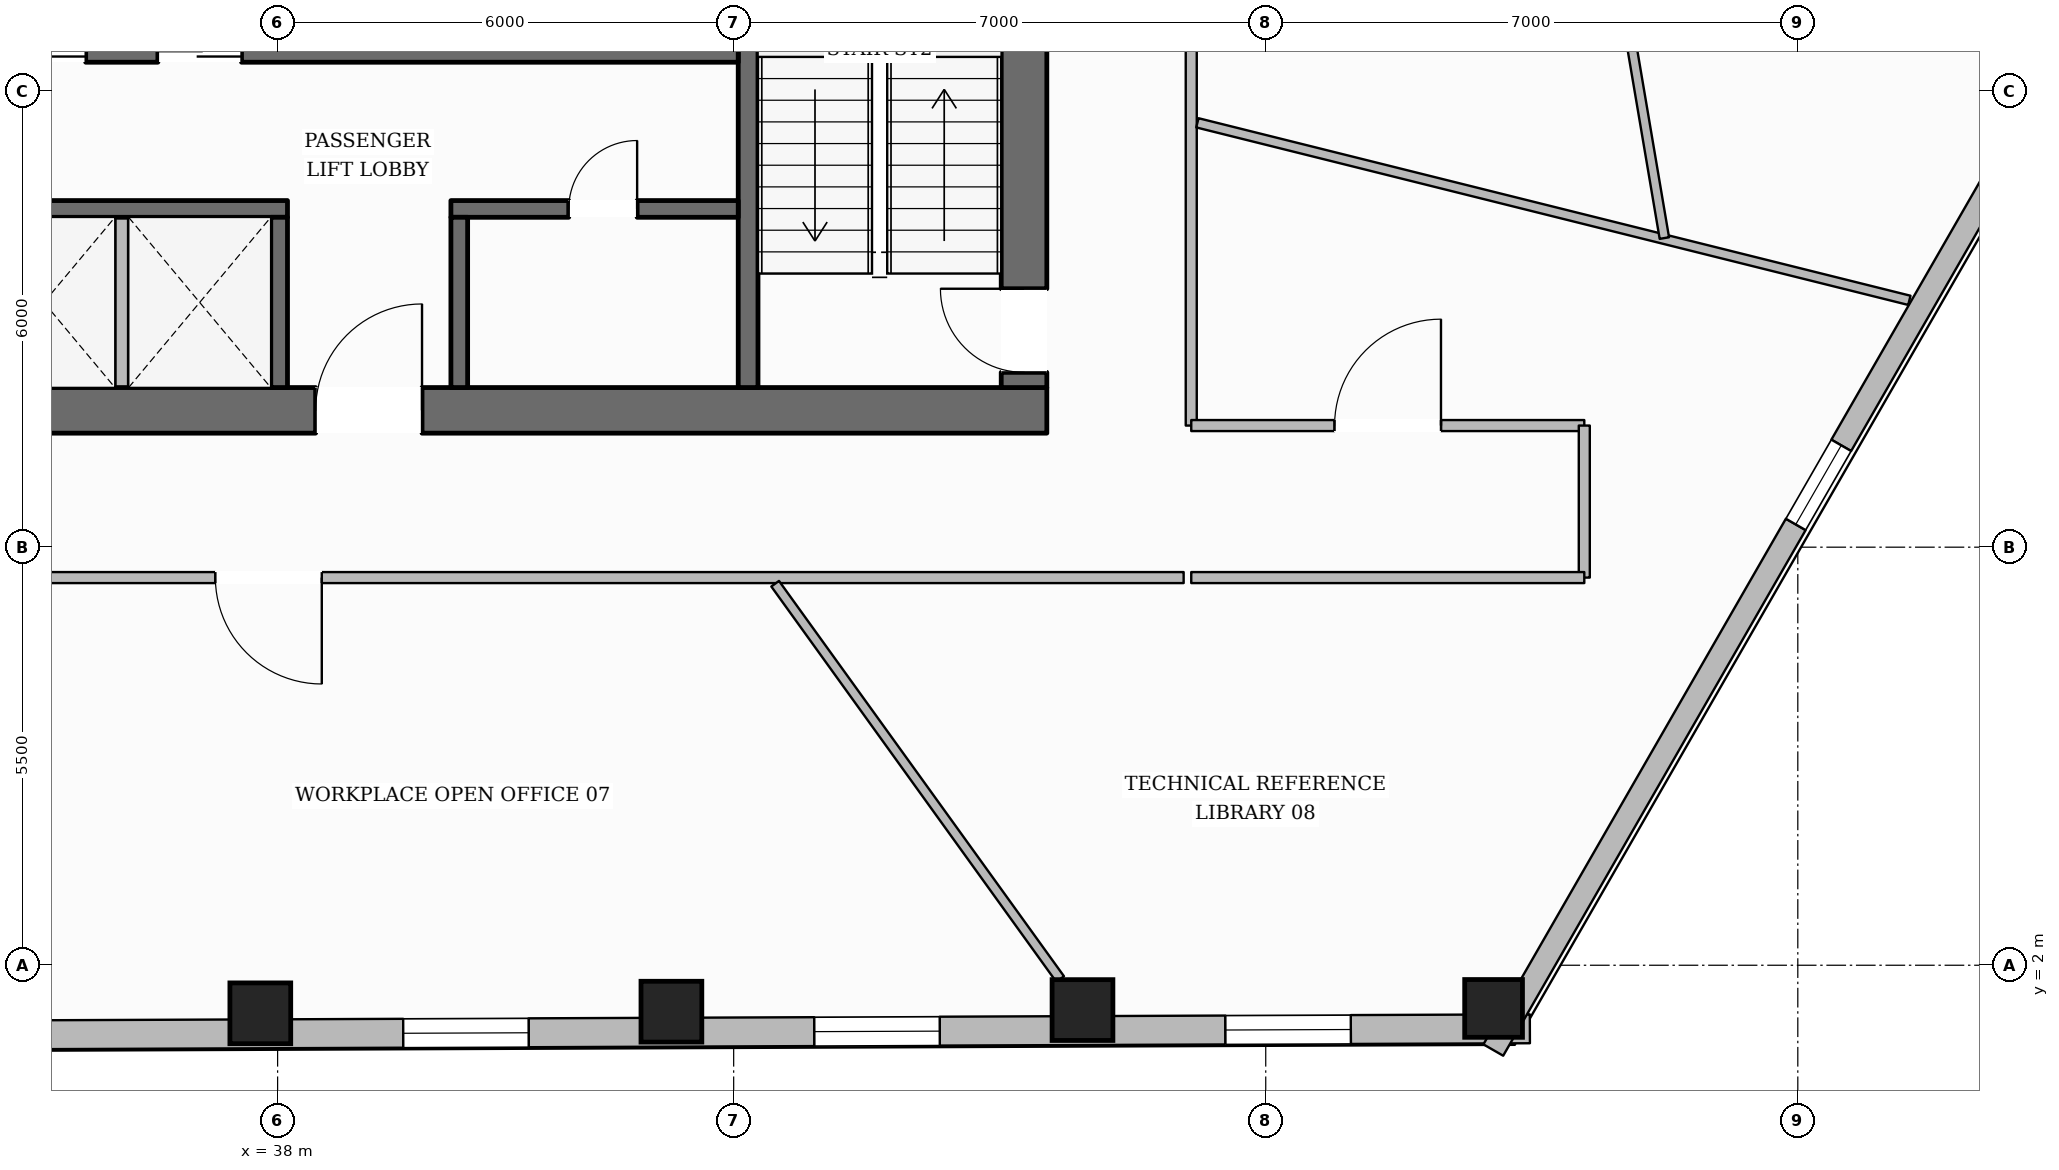
"""IFC4 building model, lengths in metres.
Left out: names, types, materials, properties, quantities, classifications, styles, units other than length and angle.
Written with IfcOpenShell. Run it as: python <this file> out.ifc"""

import sys

from ifc_helpers import new_model, si_unit, direction, frame, frame_2d, origin, origin_2d, place, context, subcontext, project, spatial, rectangle, hollow_rectangle, extrude, element, fill, save


model = new_model("IFC4")
c1 = context("Model", 3, precision=1e-05, world=origin(), true_north=direction((0.0, 1.0)))
c2 = subcontext(c1, "Body", "Model", "MODEL_VIEW")
j1 = project(units=[si_unit("LENGTHUNIT", "METRE"), si_unit("PLANEANGLEUNIT", "RADIAN")], contexts=[c1])
p1 = place(None, origin())
s1 = spatial("IfcSite", under=j1, at=p1, CompositionType="ELEMENT")
p2 = place(p1, origin())
s2 = spatial("IfcBuilding", under=s1, at=p2, CompositionType="ELEMENT")
p3 = place(p2, frame((0.0, 0.0, 13.7)))
s3 = spatial("IfcBuildingStorey", under=s2, at=p3, CompositionType="ELEMENT", Elevation=13.7)
p4 = place(p3, frame((27.88, 9.3, 0.0), z_axis=(0.0, 0.0, 1.0), x_axis=(1.0, 0.0, 0.0)))
e1 = element("IfcWall", 1, at=p4, inside=s3, PredefinedType="SOLIDWALL", context=c2, shape_type="SweptSolid", body=[
    extrude(rectangle(XDim=20.24, YDim=0.6, at=frame_2d((10.12, 0.0))), origin(), (0.0, 0.0, 1.0), 3.59),
])
p5 = place(p4, frame((10.62, 0.0, 0.0)))
e2 = element("IfcOpeningElement", 2, at=p5, cuts=e1, PredefinedType="OPENING", context=c2, shape_type="SweptSolid", body=[
    extrude(rectangle(XDim=1.4, YDim=2.2, at=frame_2d((0.7, 1.1))), frame((0.0, 0.31, 0.0), z_axis=(0.0, -1.0, 0.0), x_axis=(1.0, 0.0, 0.0)), (0.0, 0.0, 1.0), 0.62),
])
p6 = place(p3, frame((47.82, 9.6, 0.0), z_axis=(0.0, 0.0, 1.0), x_axis=(0.0, 1.0, 0.0)))
e3 = element("IfcWall", 3, at=p6, inside=s3, PredefinedType="SOLIDWALL", context=c2, shape_type="SweptSolid", body=[
    extrude(rectangle(XDim=13.0, YDim=0.6, at=frame_2d((6.5, 0.0))), origin(), (0.0, 0.0, 1.0), 3.59),
])
p7 = place(p6, frame((0.2, 0.0, 0.0)))
e4 = element("IfcOpeningElement", 4, at=p7, cuts=e3, PredefinedType="OPENING", context=c2, shape_type="SweptSolid", body=[
    extrude(rectangle(XDim=1.1, YDim=2.15, at=frame_2d((0.55, 1.075))), frame((0.0, 0.31, 0.0), z_axis=(0.0, -1.0, 0.0), x_axis=(1.0, 0.0, 0.0)), (0.0, 0.0, 1.0), 0.62),
])
p8 = place(p6, frame((8.4, 0.0, 0.0)))
e5 = element("IfcOpeningElement", 5, at=p8, cuts=e3, PredefinedType="OPENING", context=c2, shape_type="SweptSolid", body=[
    extrude(rectangle(XDim=0.9, YDim=2.1, at=frame_2d((0.45, 1.05))), frame((0.0, 0.31, 0.0), z_axis=(0.0, -1.0, 0.0), x_axis=(1.0, 0.0, 0.0)), (0.0, 0.0, 1.0), 0.62),
])
p9 = place(p3, frame((44.19, 9.6, 0.0), z_axis=(0.0, 0.0, 1.0), x_axis=(0.0, 1.0, 0.0)))
e6 = element("IfcWall", 6, at=p9, inside=s3, PredefinedType="SHEAR", context=c2, shape_type="SweptSolid", body=[
    extrude(rectangle(XDim=13.0, YDim=0.26, at=frame_2d((6.5, 0.0))), origin(), (0.0, 0.0, 1.0), 3.59),
])
p10 = place(p9, frame((10.925, 0.0, 0.0)))
e7 = element("IfcOpeningElement", 7, at=p10, cuts=e6, PredefinedType="OPENING", context=c2, shape_type="SweptSolid", body=[
    extrude(rectangle(XDim=1.25, YDim=2.25, at=frame_2d((0.625, 1.125))), frame((0.0, 0.14, 0.0), z_axis=(0.0, -1.0, 0.0), x_axis=(1.0, 0.0, 0.0)), (0.0, 0.0, 1.0), 0.28),
])
p11 = place(p3, frame((31.94, 13.99, 0.0), z_axis=(0.0, 0.0, 1.0), x_axis=(1.0, 0.0, 0.0)))
e8 = element("IfcWall", 8, at=p11, inside=s3, PredefinedType="SOLIDWALL", context=c2, shape_type="SweptSolid", body=[
    extrude(rectangle(XDim=12.12, YDim=0.22, at=frame_2d((6.06, 0.0))), origin(), (0.0, 0.0, 1.0), 3.59),
])
p12 = place(p11, frame((0.385, 0.0, 0.0)))
e9 = element("IfcOpeningElement", 9, at=p12, cuts=e8, PredefinedType="OPENING", context=c2, shape_type="SweptSolid", body=[
    extrude(rectangle(XDim=1.1, YDim=2.2, at=frame_2d((0.55, 1.1))), frame((0.0, 0.12, 0.0), z_axis=(0.0, -1.0, 0.0), x_axis=(1.0, 0.0, 0.0)), (0.0, 0.0, 1.0), 0.24),
])
p13 = place(p11, frame((2.435, 0.0, 0.0)))
e10 = element("IfcOpeningElement", 10, at=p13, cuts=e8, PredefinedType="OPENING", context=c2, shape_type="SweptSolid", body=[
    extrude(rectangle(XDim=1.1, YDim=2.2, at=frame_2d((0.55, 1.1))), frame((0.0, 0.12, 0.0), z_axis=(0.0, -1.0, 0.0), x_axis=(1.0, 0.0, 0.0)), (0.0, 0.0, 1.0), 0.24),
])
p14 = place(p11, frame((4.485, 0.0, 0.0)))
e11 = element("IfcOpeningElement", 11, at=p14, cuts=e8, PredefinedType="OPENING", context=c2, shape_type="SweptSolid", body=[
    extrude(rectangle(XDim=1.1, YDim=2.2, at=frame_2d((0.55, 1.1))), frame((0.0, 0.12, 0.0), z_axis=(0.0, -1.0, 0.0), x_axis=(1.0, 0.0, 0.0)), (0.0, 0.0, 1.0), 0.24),
])
p15 = place(p3, frame((31.94, 11.95, 0.0), z_axis=(0.0, 0.0, 1.0), x_axis=(1.0, 0.0, 0.0)))
e12 = element("IfcWall", 12, at=p15, inside=s3, PredefinedType="SOLIDWALL", context=c2, shape_type="SweptSolid", body=[
    extrude(rectangle(XDim=6.19, YDim=0.22, at=frame_2d((3.095, 0.0))), origin(), (0.0, 0.0, 1.0), 3.59),
])
p16 = place(p3, frame((40.28, 11.95, 0.0), z_axis=(0.0, 0.0, 1.0), x_axis=(1.0, 0.0, 0.0)))
e13 = element("IfcWall", 13, at=p16, inside=s3, PredefinedType="SOLIDWALL", context=c2, shape_type="SweptSolid", body=[
    extrude(rectangle(XDim=3.78, YDim=0.22, at=frame_2d((1.89, 0.0))), origin(), (0.0, 0.0, 1.0), 3.59),
])
p17 = place(p16, frame((1.55, 0.0, 0.0)))
e14 = element("IfcOpeningElement", 14, at=p17, cuts=e13, PredefinedType="OPENING", context=c2, shape_type="SweptSolid", body=[
    extrude(rectangle(XDim=0.9, YDim=2.1, at=frame_2d((0.45, 1.05))), frame((0.0, 0.12, 0.0), z_axis=(0.0, -1.0, 0.0), x_axis=(1.0, 0.0, 0.0)), (0.0, 0.0, 1.0), 0.24),
])
for number, where, z_axis, x_axis in (
    (15, (38.02, 9.6, 0.0), (0.0, 0.0, 1.0), (0.0, 1.0, 0.0)),
    (16, (40.39, 9.6, 0.0), (0.0, 0.0, 1.0), (0.0, 1.0, 0.0)),
):
    element("IfcWall", number, at=place(p3, frame(where, z_axis=z_axis, x_axis=x_axis)), inside=s3, PredefinedType="SOLIDWALL", context=c2, shape_type="SweptSolid", body=[
        extrude(rectangle(XDim=2.24, YDim=0.22, at=frame_2d((1.12, 0.0))), origin(), (0.0, 0.0, 1.0), 3.59),
    ])
for number, where, z_axis, x_axis in (
    (17, (37.772, 1.368, 0.0), (0.0, 0.0, 1.0), (1.0, 0.0, 0.0)),
    (18, (43.181, 1.389, 0.0), (0.0, 0.0, 1.0), (1.0, 0.0, 0.0)),
    (19, (48.589, 1.41, 0.0), (0.0, 0.0, 1.0), (1.0, 0.0, 0.0)),
):
    element("IfcColumn", number, at=place(p3, frame(where, z_axis=z_axis, x_axis=x_axis)), inside=s3, PredefinedType="COLUMN", context=c2, shape_type="SweptSolid", body=[
        extrude(hollow_rectangle(XDim=0.8, YDim=0.8, WallThickness=0.036, at=origin_2d()), origin(), (0.0, 0.0, 1.0), 3.59),
    ])
p18 = place(p3, frame((53.998, 1.432, 0.0), z_axis=(0.0, 0.0, 1.0), x_axis=(1.0, 0.0, 0.0)))
e20 = element("IfcColumn", 20, at=p18, inside=s3, PredefinedType="COLUMN", context=c2, shape_type="SweptSolid", body=[
    extrude(hollow_rectangle(XDim=0.76, YDim=0.76, WallThickness=0.035, at=origin_2d()), origin(), (0.0, 0.0, 1.0), 3.59),
])
p19 = place(p3, frame((54.475, 1.164, 0.0), z_axis=(0.0, 0.0, 1.0), x_axis=(-0.999992126113, -0.003968338725, 0.0)))
e21 = element("IfcWall", 21, at=p19, inside=s3, PredefinedType="STANDARD", context=c2, shape_type="SweptSolid", body=[
    extrude(rectangle(XDim=33.406, YDim=0.38, at=frame_2d((16.703, 0.0))), origin(), (0.0, 0.0, 1.0), 2.97),
])
p20 = place(p19, frame((29.397, 0.0, 0.65)))
e22 = element("IfcOpeningElement", 22, at=p20, cuts=e21, PredefinedType="OPENING", context=c2, shape_type="SweptSolid", body=[
    extrude(rectangle(XDim=1.65, YDim=1.75, at=frame_2d((0.825, 0.875))), frame((0.0, 0.2, 0.0), z_axis=(0.0, -1.0, 0.0), x_axis=(1.0, 0.0, 0.0)), (0.0, 0.0, 1.0), 0.4),
])
p21 = place(p19, frame((23.989, 0.0, 0.65)))
e23 = element("IfcOpeningElement", 23, at=p21, cuts=e21, PredefinedType="OPENING", context=c2, shape_type="SweptSolid", body=[
    extrude(rectangle(XDim=1.65, YDim=1.75, at=frame_2d((0.825, 0.875))), frame((0.0, 0.2, 0.0), z_axis=(0.0, -1.0, 0.0), x_axis=(1.0, 0.0, 0.0)), (0.0, 0.0, 1.0), 0.4),
])
p22 = place(p19, frame((13.172, 0.0, 0.65)))
e24 = element("IfcOpeningElement", 24, at=p22, cuts=e21, PredefinedType="OPENING", context=c2, shape_type="SweptSolid", body=[
    extrude(rectangle(XDim=1.65, YDim=1.75, at=frame_2d((0.825, 0.875))), frame((0.0, 0.2, 0.0), z_axis=(0.0, -1.0, 0.0), x_axis=(1.0, 0.0, 0.0)), (0.0, 0.0, 1.0), 0.4),
])
p23 = place(p19, frame((7.764, 0.0, 0.65)))
e25 = element("IfcOpeningElement", 25, at=p23, cuts=e21, PredefinedType="OPENING", context=c2, shape_type="SweptSolid", body=[
    extrude(rectangle(XDim=1.65, YDim=1.75, at=frame_2d((0.825, 0.875))), frame((0.0, 0.2, 0.0), z_axis=(0.0, -1.0, 0.0), x_axis=(1.0, 0.0, 0.0)), (0.0, 0.0, 1.0), 0.4),
])
p24 = place(p19, frame((2.355, 0.0, 0.65)))
e26 = element("IfcOpeningElement", 26, at=p24, cuts=e21, PredefinedType="OPENING", context=c2, shape_type="SweptSolid", body=[
    extrude(rectangle(XDim=1.65, YDim=1.75, at=frame_2d((0.825, 0.875))), frame((0.0, 0.2, 0.0), z_axis=(0.0, -1.0, 0.0), x_axis=(1.0, 0.0, 0.0)), (0.0, 0.0, 1.0), 0.4),
])
p25 = place(p3, frame((62.551, 15.755, 0.0), z_axis=(0.0, 0.0, 1.0), x_axis=(-0.498758778038, -0.866740838619, 0.0)))
e27 = element("IfcWall", 27, at=p25, inside=s3, PredefinedType="STANDARD", context=c2, shape_type="SweptSolid", body=[
    extrude(rectangle(XDim=17.156, YDim=0.3, at=frame_2d((8.578, 0.0))), origin(), (0.0, 0.0, 1.0), 2.97),
])
p26 = place(p25, frame((7.978, 0.0, 0.65)))
e28 = element("IfcOpeningElement", 28, at=p26, cuts=e27, PredefinedType="OPENING", context=c2, shape_type="SweptSolid", body=[
    extrude(rectangle(XDim=1.2, YDim=1.7, at=frame_2d((0.6, 0.85))), frame((0.0, 0.16, 0.0), z_axis=(0.0, -1.0, 0.0), x_axis=(1.0, 0.0, 0.0)), (0.0, 0.0, 1.0), 0.32),
])
p27 = place(p3, frame((35.95, 9.6, 0.0), z_axis=(0.0, 0.0, 1.0), x_axis=(0.0, 1.0, 0.0)))
e29 = element("IfcWall", 29, at=p27, inside=s3, PredefinedType="PARTITIONING", context=c2, shape_type="SweptSolid", body=[
    extrude(rectangle(XDim=2.24, YDim=0.165, at=frame_2d((1.12, 0.0))), origin(), (0.0, 0.0, 1.0), 3.59),
])
p28 = place(p3, frame((50.02, 25.1, 0.0), z_axis=(0.0, 0.0, 1.0), x_axis=(0.0, -1.0, 0.0)))
e30 = element("IfcWall", 30, at=p28, inside=s3, PredefinedType="PARTITIONING", context=c2, shape_type="SweptSolid", body=[
    extrude(rectangle(XDim=16.0, YDim=0.145, at=frame_2d((8.0, 0.0))), origin(), (0.0, 0.0, 1.0), 3.278),
])
p29 = place(p28, frame((5.393, 0.0, 0.0)))
e31 = element("IfcOpeningElement", 31, at=p29, cuts=e30, PredefinedType="OPENING", context=c2, shape_type="SweptSolid", body=[
    extrude(rectangle(XDim=1.4, YDim=2.2, at=frame_2d((0.7, 1.1))), frame((0.0, 0.083, 0.0), z_axis=(0.0, -1.0, 0.0), x_axis=(1.0, 0.0, 0.0)), (0.0, 0.0, 1.0), 0.165),
])
p30 = place(p3, frame((50.02, 9.1, 0.0), z_axis=(0.0, 0.0, 1.0), x_axis=(1.0, 0.0, 0.0)))
e32 = element("IfcWall", 32, at=p30, inside=s3, PredefinedType="PARTITIONING", context=c2, shape_type="SweptSolid", body=[
    extrude(rectangle(XDim=5.171, YDim=0.145, at=frame_2d((2.585, 0.0))), origin(), (0.0, 0.0, 1.0), 3.59),
])
p31 = place(p30, frame((1.885, 0.0, 0.0)))
e33 = element("IfcOpeningElement", 33, at=p31, cuts=e32, PredefinedType="OPENING", context=c2, shape_type="SweptSolid", body=[
    extrude(rectangle(XDim=1.4, YDim=2.2, at=frame_2d((0.7, 1.1))), frame((0.0, 0.083, 0.0), z_axis=(0.0, -1.0, 0.0), x_axis=(1.0, 0.0, 0.0)), (0.0, 0.0, 1.0), 0.165),
])
p32 = place(p3, frame((55.191, 9.1, 0.0), z_axis=(0.0, 0.0, 1.0), x_axis=(0.0, -1.0, 0.0)))
e34 = element("IfcWall", 34, at=p32, inside=s3, PredefinedType="PARTITIONING", context=c2, shape_type="SweptSolid", body=[
    extrude(rectangle(XDim=2.0, YDim=0.145, at=frame_2d((1.0, 0.0))), origin(), (0.0, 0.0, 1.0), 3.59),
])
p33 = place(p3, frame((55.191, 7.1, 0.0), z_axis=(0.0, 0.0, 1.0), x_axis=(-1.0, 0.0, 0.0)))
e35 = element("IfcWall", 35, at=p33, inside=s3, PredefinedType="PARTITIONING", context=c2, shape_type="SweptSolid", body=[
    extrude(rectangle(XDim=5.171, YDim=0.145, at=frame_2d((2.585, 0.0))), origin(), (0.0, 0.0, 1.0), 3.59),
])
p34 = place(p3, frame((49.92, 7.1, 0.0), z_axis=(0.0, 0.0, 1.0), x_axis=(-1.0, 0.0, 0.0)))
e36 = element("IfcWall", 36, at=p34, inside=s3, PredefinedType="PARTITIONING", context=c2, shape_type="SweptSolid", body=[
    extrude(rectangle(XDim=23.84, YDim=0.145, at=frame_2d((11.92, 0.0))), origin(), (0.0, 0.0, 1.0), 3.278),
])
p35 = place(p34, frame((20.905, 0.0, 0.0)))
e37 = element("IfcOpeningElement", 37, at=p35, cuts=e36, PredefinedType="OPENING", context=c2, shape_type="SweptSolid", body=[
    extrude(rectangle(XDim=0.98, YDim=2.15, at=frame_2d((0.49, 1.075))), frame((0.0, 0.083, 0.0), z_axis=(0.0, -1.0, 0.0), x_axis=(1.0, 0.0, 0.0)), (0.0, 0.0, 1.0), 0.165),
])
p36 = place(p34, frame((11.339, 0.0, 0.0)))
e38 = element("IfcOpeningElement", 38, at=p36, cuts=e36, PredefinedType="OPENING", context=c2, shape_type="SweptSolid", body=[
    extrude(rectangle(XDim=1.4, YDim=2.2, at=frame_2d((0.7, 1.1))), frame((0.0, 0.083, 0.0), z_axis=(0.0, -1.0, 0.0), x_axis=(1.0, 0.0, 0.0)), (0.0, 0.0, 1.0), 0.165),
])
p37 = place(p3, frame((44.546, 7.02, 0.0), z_axis=(0.0, 0.0, 1.0), x_axis=(0.584759038679, -0.811207043043, 0.0)))
e39 = element("IfcWall", 39, at=p37, inside=s3, PredefinedType="PARTITIONING", context=c2, shape_type="SweptSolid", body=[
    extrude(rectangle(XDim=6.412, YDim=0.125, at=frame_2d((3.206, 0.0))), origin(), (0.0, 0.0, 1.0), 3.59),
])
p38 = place(p3, frame((50.101, 13.083, 0.0), z_axis=(0.0, 0.0, 1.0), x_axis=(0.970295533253, -0.241922669771, 0.0)))
e40 = element("IfcWall", 40, at=p38, inside=s3, PredefinedType="PARTITIONING", context=c2, shape_type="SweptSolid", body=[
    extrude(rectangle(XDim=9.654, YDim=0.125, at=frame_2d((4.827, 0.0))), origin(), (0.0, 0.0, 1.0), 3.59),
])
p39 = place(p3, frame((56.244, 11.567, 0.0), z_axis=(0.0, 0.0, 1.0), x_axis=(-0.167295506577, 0.985906797562, 0.0)))
e41 = element("IfcWall", 41, at=p39, inside=s3, PredefinedType="PARTITIONING", context=c2, shape_type="SweptSolid", body=[
    extrude(rectangle(XDim=17.655, YDim=0.125, at=frame_2d((8.828, 0.0))), origin(), (0.0, 0.0, 1.0), 3.278),
])
p40 = place(p39, frame((8.33, 0.0, 0.0)))
e42 = element("IfcOpeningElement", 42, at=p40, cuts=e41, PredefinedType="OPENING", context=c2, shape_type="SweptSolid", body=[
    extrude(rectangle(XDim=0.98, YDim=2.15, at=frame_2d((0.49, 1.075))), frame((0.0, 0.073, 0.0), z_axis=(0.0, -1.0, 0.0), x_axis=(1.0, 0.0, 0.0)), (0.0, 0.0, 1.0), 0.145),
])
p41 = place(p22, origin())
e43 = element("IfcWindow", 43, at=p41, inside=s3, PartitioningType="SINGLE_PANEL", PredefinedType="WINDOW", context=c2, shape_type="SweptSolid", body=[
    extrude(rectangle(XDim=1.65, YDim=1.75, at=frame_2d((0.825, 0.875))), frame((0.0, 0.03, 0.0), z_axis=(0.0, -1.0, 0.0), x_axis=(1.0, 0.0, 0.0)), (0.0, 0.0, 1.0), 0.06),
])
fill(e24, e43)
p42 = place(p23, origin())
e44 = element("IfcWindow", 44, at=p42, inside=s3, PartitioningType="SINGLE_PANEL", PredefinedType="WINDOW", context=c2, shape_type="SweptSolid", body=[
    extrude(rectangle(XDim=1.65, YDim=1.75, at=frame_2d((0.825, 0.875))), frame((0.0, 0.03, 0.0), z_axis=(0.0, -1.0, 0.0), x_axis=(1.0, 0.0, 0.0)), (0.0, 0.0, 1.0), 0.06),
])
fill(e25, e44)
p43 = place(p24, origin())
e45 = element("IfcWindow", 45, at=p43, inside=s3, PartitioningType="SINGLE_PANEL", PredefinedType="WINDOW", context=c2, shape_type="SweptSolid", body=[
    extrude(rectangle(XDim=1.65, YDim=1.75, at=frame_2d((0.825, 0.875))), frame((0.0, 0.03, 0.0), z_axis=(0.0, -1.0, 0.0), x_axis=(1.0, 0.0, 0.0)), (0.0, 0.0, 1.0), 0.06),
])
fill(e26, e45)
p44 = place(p26, origin())
e46 = element("IfcWindow", 46, at=p44, inside=s3, PartitioningType="SINGLE_PANEL", PredefinedType="WINDOW", context=c2, shape_type="SweptSolid", body=[
    extrude(rectangle(XDim=1.2, YDim=1.7, at=frame_2d((0.6, 0.85))), frame((0.0, 0.03, 0.0), z_axis=(0.0, -1.0, 0.0), x_axis=(1.0, 0.0, 0.0)), (0.0, 0.0, 1.0), 0.06),
])
fill(e28, e46)
p45 = place(p7, origin())
e47 = element("IfcDoor", 47, at=p45, inside=s3, OperationType="SINGLE_SWING_RIGHT", PredefinedType="DOOR", context=c2, shape_type="SweptSolid", body=[
    extrude(rectangle(XDim=1.1, YDim=2.15, at=frame_2d((0.55, 1.075))), frame((0.0, 0.025, 0.0), z_axis=(0.0, -1.0, 0.0), x_axis=(1.0, 0.0, 0.0)), (0.0, 0.0, 1.0), 0.05),
])
fill(e4, e47)
p46 = place(p5, origin())
e48 = element("IfcDoor", 48, at=p46, inside=s3, OperationType="SINGLE_SWING_RIGHT", PredefinedType="DOOR", context=c2, shape_type="SweptSolid", body=[
    extrude(rectangle(XDim=1.4, YDim=2.2, at=frame_2d((0.7, 1.1))), frame((0.0, 0.025, 0.0), z_axis=(0.0, -1.0, 0.0), x_axis=(1.0, 0.0, 0.0)), (0.0, 0.0, 1.0), 0.05),
])
fill(e2, e48)
p47 = place(p13, origin())
e49 = element("IfcDoor", 49, at=p47, inside=s3, OperationType="DOUBLE_DOOR_SLIDING", PredefinedType="DOOR", context=c2, shape_type="SweptSolid", body=[
    extrude(rectangle(XDim=1.1, YDim=2.2, at=frame_2d((0.55, 1.1))), frame((0.0, 0.025, 0.0), z_axis=(0.0, -1.0, 0.0), x_axis=(1.0, 0.0, 0.0)), (0.0, 0.0, 1.0), 0.05),
])
fill(e10, e49)
p48 = place(p14, origin())
e50 = element("IfcDoor", 50, at=p48, inside=s3, OperationType="DOUBLE_DOOR_SLIDING", PredefinedType="DOOR", context=c2, shape_type="SweptSolid", body=[
    extrude(rectangle(XDim=1.1, YDim=2.2, at=frame_2d((0.55, 1.1))), frame((0.0, 0.025, 0.0), z_axis=(0.0, -1.0, 0.0), x_axis=(1.0, 0.0, 0.0)), (0.0, 0.0, 1.0), 0.05),
])
fill(e11, e50)
p49 = place(p17, origin())
e51 = element("IfcDoor", 51, at=p49, inside=s3, OperationType="SINGLE_SWING_RIGHT", PredefinedType="DOOR", context=c2, shape_type="SweptSolid", body=[
    extrude(rectangle(XDim=0.9, YDim=2.1, at=frame_2d((0.45, 1.05))), frame((0.0, 0.025, 0.0), z_axis=(0.0, -1.0, 0.0), x_axis=(1.0, 0.0, 0.0)), (0.0, 0.0, 1.0), 0.05),
])
fill(e14, e51)
p50 = place(p36, origin())
e52 = element("IfcDoor", 52, at=p50, inside=s3, OperationType="SINGLE_SWING_LEFT", PredefinedType="DOOR", context=c2, shape_type="SweptSolid", body=[
    extrude(rectangle(XDim=1.4, YDim=2.2, at=frame_2d((0.7, 1.1))), frame((0.0, 0.025, 0.0), z_axis=(0.0, -1.0, 0.0), x_axis=(1.0, 0.0, 0.0)), (0.0, 0.0, 1.0), 0.05),
])
fill(e38, e52)
p51 = place(p31, origin())
e53 = element("IfcDoor", 53, at=p51, inside=s3, OperationType="SINGLE_SWING_RIGHT", PredefinedType="DOOR", context=c2, shape_type="SweptSolid", body=[
    extrude(rectangle(XDim=1.4, YDim=2.2, at=frame_2d((0.7, 1.1))), frame((0.0, 0.025, 0.0), z_axis=(0.0, -1.0, 0.0), x_axis=(1.0, 0.0, 0.0)), (0.0, 0.0, 1.0), 0.05),
])
fill(e33, e53)
save(model, sys.argv[1])
